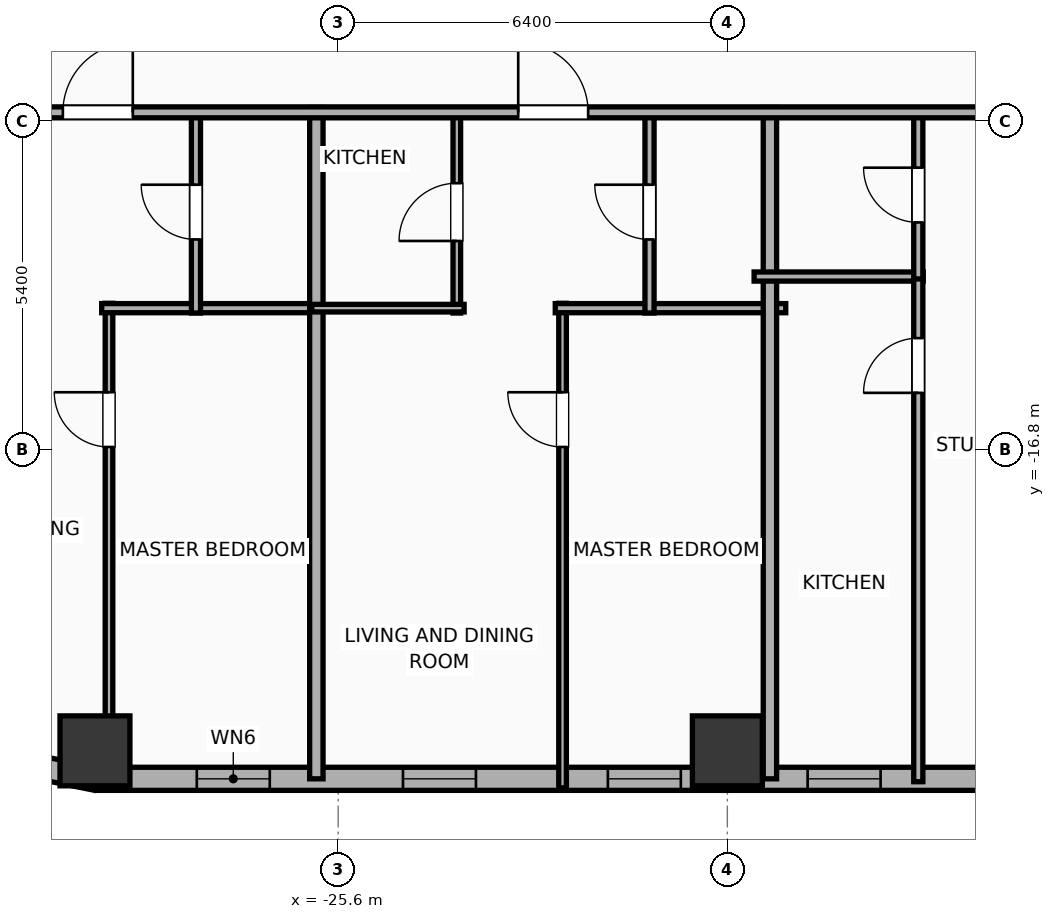
"""IFC4 building model, lengths in metres.
Left out: names, types, materials, properties, quantities, classifications, styles, units other than length and angle.
Written with IfcOpenShell. Run it as: python <this file> out.ifc"""

import sys

from ifc_helpers import new_model, si_unit, direction, frame, frame_2d, origin, origin_2d, place, context, subcontext, project, spatial, rectangle, hollow_rectangle, extrude, element, fill, save


model = new_model("IFC4")
c1 = context("Model", 3, precision=1e-05, world=origin(), true_north=direction((0.0, 1.0)))
c2 = subcontext(c1, "Body", "Model", "MODEL_VIEW")
j1 = project(units=[si_unit("LENGTHUNIT", "METRE"), si_unit("PLANEANGLEUNIT", "RADIAN")], contexts=[c1])
p1 = place(None, origin())
s1 = spatial("IfcSite", under=j1, at=p1, CompositionType="ELEMENT")
p2 = place(p1, origin())
s2 = spatial("IfcBuilding", under=s1, at=p2, CompositionType="ELEMENT")
p3 = place(p2, frame((0.0, 0.0, 76.7)))
s3 = spatial("IfcBuildingStorey", under=s2, at=p3, CompositionType="ELEMENT", Elevation=76.7)
for number, where, z_axis, x_axis in (
    (1, (-29.6, -21.75, 0.0), (0.0, 0.0, 1.0), (1.0, 0.0, 0.0)),
    (2, (-19.2, -21.75, 0.0), (0.0, 0.0, 1.0), (1.0, 0.0, 0.0)),
):
    element("IfcColumn", number, at=place(p3, frame(where, z_axis=z_axis, x_axis=x_axis)), inside=s3, PredefinedType="COLUMN", context=c2, shape_type="SweptSolid", body=[
        extrude(hollow_rectangle(XDim=1.15, YDim=1.15, WallThickness=0.04, at=origin_2d()), origin(), (0.0, 0.0, 1.0), 3.9),
    ])
p4 = place(p3, frame((22.381, -22.21, 0.0), z_axis=(0.0, 0.0, 1.0), x_axis=(-1.0, 0.0, 0.0)))
e3 = element("IfcWall", 3, at=p4, inside=s3, PredefinedType="ELEMENTEDWALL", context=c2, shape_type="SweptSolid", body=[
    extrude(rectangle(XDim=51.963, YDim=0.38, at=frame_2d((25.981, 0.0))), origin(), (0.0, 0.0, 1.0), 3.6),
])
p5 = place(p4, frame((5.81, 0.0, 0.75)))
e4 = element("IfcOpeningElement", 4, at=p5, cuts=e3, PredefinedType="OPENING", context=c2, shape_type="SweptSolid", body=[
    extrude(rectangle(XDim=2.4, YDim=2.1, at=frame_2d((1.2, 1.05))), frame((0.0, 0.2, 0.0), z_axis=(0.0, -1.0, 0.0), x_axis=(1.0, 0.0, 0.0)), (0.0, 0.0, 1.0), 0.4),
])
p6 = place(p4, frame((49.106, 0.0, 0.75)))
e5 = element("IfcOpeningElement", 5, at=p6, cuts=e3, PredefinedType="OPENING", context=c2, shape_type="SweptSolid", body=[
    extrude(rectangle(XDim=1.2, YDim=2.05, at=frame_2d((0.6, 1.025))), frame((0.0, 0.2, 0.0), z_axis=(0.0, -1.0, 0.0), x_axis=(1.0, 0.0, 0.0)), (0.0, 0.0, 1.0), 0.4),
])
p7 = place(p4, frame((45.716, 0.0, 0.75)))
e6 = element("IfcOpeningElement", 6, at=p7, cuts=e3, PredefinedType="OPENING", context=c2, shape_type="SweptSolid", body=[
    extrude(rectangle(XDim=1.2, YDim=2.05, at=frame_2d((0.6, 1.025))), frame((0.0, 0.2, 0.0), z_axis=(0.0, -1.0, 0.0), x_axis=(1.0, 0.0, 0.0)), (0.0, 0.0, 1.0), 0.4),
])
p8 = place(p4, frame((42.346, 0.0, 0.75)))
e7 = element("IfcOpeningElement", 7, at=p8, cuts=e3, PredefinedType="OPENING", context=c2, shape_type="SweptSolid", body=[
    extrude(rectangle(XDim=1.2, YDim=2.05, at=frame_2d((0.6, 1.025))), frame((0.0, 0.2, 0.0), z_axis=(0.0, -1.0, 0.0), x_axis=(1.0, 0.0, 0.0)), (0.0, 0.0, 1.0), 0.4),
])
p9 = place(p4, frame((35.811, 0.0, 0.75)))
e8 = element("IfcOpeningElement", 8, at=p9, cuts=e3, PredefinedType="OPENING", context=c2, shape_type="SweptSolid", body=[
    extrude(rectangle(XDim=1.2, YDim=2.05, at=frame_2d((0.6, 1.025))), frame((0.0, 0.2, 0.0), z_axis=(0.0, -1.0, 0.0), x_axis=(1.0, 0.0, 0.0)), (0.0, 0.0, 1.0), 0.4),
])
p10 = place(p4, frame((39.061, 0.0, 0.75)))
e9 = element("IfcOpeningElement", 9, at=p10, cuts=e3, PredefinedType="OPENING", context=c2, shape_type="SweptSolid", body=[
    extrude(rectangle(XDim=1.2, YDim=2.05, at=frame_2d((0.6, 1.025))), frame((0.0, 0.2, 0.0), z_axis=(0.0, -1.0, 0.0), x_axis=(1.0, 0.0, 0.0)), (0.0, 0.0, 1.0), 0.4),
])
p11 = place(p4, frame((29.211, 0.0, 0.75)))
e10 = element("IfcOpeningElement", 10, at=p11, cuts=e3, PredefinedType="OPENING", context=c2, shape_type="SweptSolid", body=[
    extrude(rectangle(XDim=1.2, YDim=2.05, at=frame_2d((0.6, 1.025))), frame((0.0, 0.2, 0.0), z_axis=(0.0, -1.0, 0.0), x_axis=(1.0, 0.0, 0.0)), (0.0, 0.0, 1.0), 0.4),
])
p12 = place(p4, frame((22.757, 0.0, 0.75)))
e11 = element("IfcOpeningElement", 11, at=p12, cuts=e3, PredefinedType="OPENING", context=c2, shape_type="SweptSolid", body=[
    extrude(rectangle(XDim=1.2, YDim=2.05, at=frame_2d((0.6, 1.025))), frame((0.0, 0.2, 0.0), z_axis=(0.0, -1.0, 0.0), x_axis=(1.0, 0.0, 0.0)), (0.0, 0.0, 1.0), 0.4),
])
p13 = place(p4, frame((26.007, 0.0, 0.75)))
e12 = element("IfcOpeningElement", 12, at=p13, cuts=e3, PredefinedType="OPENING", context=c2, shape_type="SweptSolid", body=[
    extrude(rectangle(XDim=1.2, YDim=2.05, at=frame_2d((0.6, 1.025))), frame((0.0, 0.2, 0.0), z_axis=(0.0, -1.0, 0.0), x_axis=(1.0, 0.0, 0.0)), (0.0, 0.0, 1.0), 0.4),
])
p14 = place(p4, frame((18.697, 0.0, 0.75)))
e13 = element("IfcOpeningElement", 13, at=p14, cuts=e3, PredefinedType="OPENING", context=c2, shape_type="SweptSolid", body=[
    extrude(rectangle(XDim=1.2, YDim=2.05, at=frame_2d((0.6, 1.025))), frame((0.0, 0.2, 0.0), z_axis=(0.0, -1.0, 0.0), x_axis=(1.0, 0.0, 0.0)), (0.0, 0.0, 1.0), 0.4),
])
p15 = place(p4, frame((15.447, 0.0, 0.75)))
e14 = element("IfcOpeningElement", 14, at=p15, cuts=e3, PredefinedType="OPENING", context=c2, shape_type="SweptSolid", body=[
    extrude(rectangle(XDim=1.2, YDim=2.05, at=frame_2d((0.6, 1.025))), frame((0.0, 0.2, 0.0), z_axis=(0.0, -1.0, 0.0), x_axis=(1.0, 0.0, 0.0)), (0.0, 0.0, 1.0), 0.4),
])
p16 = place(p4, frame((11.162, 0.0, 0.75)))
e15 = element("IfcOpeningElement", 15, at=p16, cuts=e3, PredefinedType="OPENING", context=c2, shape_type="SweptSolid", body=[
    extrude(rectangle(XDim=1.2, YDim=2.05, at=frame_2d((0.6, 1.025))), frame((0.0, 0.2, 0.0), z_axis=(0.0, -1.0, 0.0), x_axis=(1.0, 0.0, 0.0)), (0.0, 0.0, 1.0), 0.4),
])
p17 = place(p4, frame((2.974, 0.0, 0.75)))
e16 = element("IfcOpeningElement", 16, at=p17, cuts=e3, PredefinedType="OPENING", context=c2, shape_type="SweptSolid", body=[
    extrude(rectangle(XDim=1.2, YDim=2.05, at=frame_2d((0.6, 1.025))), frame((0.0, 0.2, 0.0), z_axis=(0.0, -1.0, 0.0), x_axis=(1.0, 0.0, 0.0)), (0.0, 0.0, 1.0), 0.4),
])
p18 = place(p4, frame((0.927, 0.0, 0.75)))
e17 = element("IfcOpeningElement", 17, at=p18, cuts=e3, PredefinedType="OPENING", context=c2, shape_type="SweptSolid", body=[
    extrude(rectangle(XDim=1.2, YDim=2.05, at=frame_2d((0.6, 1.025))), frame((0.0, 0.2, 0.0), z_axis=(0.0, -1.0, 0.0), x_axis=(1.0, 0.0, 0.0)), (0.0, 0.0, 1.0), 0.4),
])
p19 = place(p3, frame((-29.581, -22.21, 0.0), z_axis=(0.0, 0.0, 1.0), x_axis=(-0.980786132421, 0.195086038585, 0.0)))
e18 = element("IfcWall", 18, at=p19, inside=s3, PredefinedType="ELEMENTEDWALL", context=c2, shape_type="SweptSolid", body=[
    extrude(rectangle(XDim=1.504, YDim=0.38, at=frame_2d((0.752, 0.0))), origin(), (0.0, 0.0, 1.0), 3.6),
])
p20 = place(p3, frame((-29.369, -22.36, 0.0), z_axis=(0.0, 0.0, 1.0), x_axis=(0.0, 1.0, 0.0)))
e19 = element("IfcWall", 19, at=p20, inside=s3, PredefinedType="PARTITIONING", context=c2, shape_type="SweptSolid", body=[
    extrude(rectangle(XDim=7.97, YDim=0.125, at=frame_2d((3.985, 0.0))), origin(), (0.0, 0.0, 1.0), 3.6),
])
p21 = place(p20, frame((5.607, 0.0, 0.0)))
e20 = element("IfcOpeningElement", 20, at=p21, cuts=e19, PredefinedType="OPENING", context=c2, shape_type="SweptSolid", body=[
    extrude(rectangle(XDim=0.9, YDim=2.05, at=frame_2d((0.45, 1.025))), frame((0.0, 0.073, 0.0), z_axis=(0.0, -1.0, 0.0), x_axis=(1.0, 0.0, 0.0)), (0.0, 0.0, 1.0), 0.145),
])
p22 = place(p3, frame((-29.489, -14.47, 0.0), z_axis=(0.0, 0.0, 1.0), x_axis=(1.0, 0.0, 0.0)))
e21 = element("IfcWall", 21, at=p22, inside=s3, PredefinedType="PLUMBINGWALL", context=c2, shape_type="SweptSolid", body=[
    extrude(rectangle(XDim=3.605, YDim=0.15, at=frame_2d((1.802, 0.0))), origin(), (0.0, 0.0, 1.0), 3.6),
])
p23 = place(p3, frame((-27.939, -14.55, 0.0), z_axis=(0.0, 0.0, 1.0), x_axis=(0.0, 1.0, 0.0)))
e22 = element("IfcWall", 22, at=p23, inside=s3, PredefinedType="PLUMBINGWALL", context=c2, shape_type="SweptSolid", body=[
    extrude(rectangle(XDim=3.32, YDim=0.15, at=frame_2d((1.66, 0.0))), origin(), (0.0, 0.0, 1.0), 3.6),
])
p24 = place(p23, frame((1.21, 0.0, 0.0)))
e23 = element("IfcOpeningElement", 23, at=p24, cuts=e22, PredefinedType="OPENING", context=c2, shape_type="SweptSolid", body=[
    extrude(rectangle(XDim=0.9, YDim=2.05, at=frame_2d((0.45, 1.025))), frame((0.0, 0.085, 0.0), z_axis=(0.0, -1.0, 0.0), x_axis=(1.0, 0.0, 0.0)), (0.0, 0.0, 1.0), 0.17),
])
p25 = place(p3, frame((-25.959, -22.21, 0.0), z_axis=(0.0, 0.0, 1.0), x_axis=(0.0, 1.0, 0.0)))
e24 = element("IfcWall", 24, at=p25, inside=s3, PredefinedType="PARTITIONING", context=c2, shape_type="SweptSolid", body=[
    extrude(rectangle(XDim=11.04, YDim=0.22, at=frame_2d((5.52, 0.0))), origin(), (0.0, 0.0, 1.0), 3.6),
])
p26 = place(p3, frame((-21.91, -22.36, 0.0), z_axis=(0.0, 0.0, 1.0), x_axis=(0.0, 1.0, 0.0)))
e25 = element("IfcWall", 25, at=p26, inside=s3, PredefinedType="PARTITIONING", context=c2, shape_type="SweptSolid", body=[
    extrude(rectangle(XDim=7.97, YDim=0.125, at=frame_2d((3.985, 0.0))), origin(), (0.0, 0.0, 1.0), 3.6),
])
p27 = place(p26, frame((5.607, 0.0, 0.0)))
e26 = element("IfcOpeningElement", 26, at=p27, cuts=e25, PredefinedType="OPENING", context=c2, shape_type="SweptSolid", body=[
    extrude(rectangle(XDim=0.9, YDim=2.05, at=frame_2d((0.45, 1.025))), frame((0.0, 0.073, 0.0), z_axis=(0.0, -1.0, 0.0), x_axis=(1.0, 0.0, 0.0)), (0.0, 0.0, 1.0), 0.145),
])
p28 = place(p3, frame((-22.03, -14.47, 0.0), z_axis=(0.0, 0.0, 1.0), x_axis=(1.0, 0.0, 0.0)))
e27 = element("IfcWall", 27, at=p28, inside=s3, PredefinedType="PLUMBINGWALL", context=c2, shape_type="SweptSolid", body=[
    extrude(rectangle(XDim=3.79, YDim=0.15, at=frame_2d((1.895, 0.0))), origin(), (0.0, 0.0, 1.0), 3.6),
])
p29 = place(p3, frame((-23.649, -14.55, 0.0), z_axis=(0.0, 0.0, 1.0), x_axis=(0.0, 1.0, 0.0)))
e28 = element("IfcWall", 28, at=p29, inside=s3, PredefinedType="PARTITIONING", context=c2, shape_type="SweptSolid", body=[
    extrude(rectangle(XDim=3.32, YDim=0.125, at=frame_2d((1.66, 0.0))), origin(), (0.0, 0.0, 1.0), 3.6),
])
p30 = place(p29, frame((1.185, 0.0, 0.0)))
e29 = element("IfcOpeningElement", 29, at=p30, cuts=e28, PredefinedType="OPENING", context=c2, shape_type="SweptSolid", body=[
    extrude(rectangle(XDim=0.95, YDim=2.05, at=frame_2d((0.475, 1.025))), frame((0.0, 0.073, 0.0), z_axis=(0.0, -1.0, 0.0), x_axis=(1.0, 0.0, 0.0)), (0.0, 0.0, 1.0), 0.145),
])
p31 = place(p3, frame((-26.034, -14.47, 0.0), z_axis=(0.0, 0.0, 1.0), x_axis=(1.0, 0.0, 0.0)))
e30 = element("IfcWall", 30, at=p31, inside=s3, PredefinedType="PARTITIONING", context=c2, shape_type="SweptSolid", body=[
    extrude(rectangle(XDim=2.505, YDim=0.125, at=frame_2d((1.252, 0.0))), origin(), (0.0, 0.0, 1.0), 3.6),
])
p32 = place(p3, frame((-20.48, -14.55, 0.0), z_axis=(0.0, 0.0, 1.0), x_axis=(0.0, 1.0, 0.0)))
e31 = element("IfcWall", 31, at=p32, inside=s3, PredefinedType="PLUMBINGWALL", context=c2, shape_type="SweptSolid", body=[
    extrude(rectangle(XDim=3.32, YDim=0.15, at=frame_2d((1.66, 0.0))), origin(), (0.0, 0.0, 1.0), 3.6),
])
p33 = place(p32, frame((1.21, 0.0, 0.0)))
e32 = element("IfcOpeningElement", 32, at=p33, cuts=e31, PredefinedType="OPENING", context=c2, shape_type="SweptSolid", body=[
    extrude(rectangle(XDim=0.9, YDim=2.05, at=frame_2d((0.45, 1.025))), frame((0.0, 0.085, 0.0), z_axis=(0.0, -1.0, 0.0), x_axis=(1.0, 0.0, 0.0)), (0.0, 0.0, 1.0), 0.17),
])
p34 = place(p3, frame((-18.5, -22.21, 0.0), z_axis=(0.0, 0.0, 1.0), x_axis=(0.0, 1.0, 0.0)))
e33 = element("IfcWall", 33, at=p34, inside=s3, PredefinedType="PARTITIONING", context=c2, shape_type="SweptSolid", body=[
    extrude(rectangle(XDim=11.04, YDim=0.22, at=frame_2d((5.52, 0.0))), origin(), (0.0, 0.0, 1.0), 3.6),
])
p35 = place(p3, frame((-18.76, -13.95, 0.0), z_axis=(0.0, 0.0, 1.0), x_axis=(1.0, 0.0, 0.0)))
e34 = element("IfcWall", 34, at=p35, inside=s3, PredefinedType="PLUMBINGWALL", context=c2, shape_type="SweptSolid", body=[
    extrude(rectangle(XDim=2.78, YDim=0.15, at=frame_2d((1.39, 0.0))), origin(), (0.0, 0.0, 1.0), 3.6),
])
p36 = place(p3, frame((-16.06, -22.258, 0.0), z_axis=(0.0, 0.0, 1.0), x_axis=(0.0, 1.0, 0.0)))
e35 = element("IfcWall", 35, at=p36, inside=s3, PredefinedType="PLUMBINGWALL", context=c2, shape_type="SweptSolid", body=[
    extrude(rectangle(XDim=8.348, YDim=0.15, at=frame_2d((4.174, 0.0))), origin(), (0.0, 0.0, 1.0), 3.6),
])
p37 = place(p36, frame((6.395, 0.0, 0.0)))
e36 = element("IfcOpeningElement", 36, at=p37, cuts=e35, PredefinedType="OPENING", context=c2, shape_type="SweptSolid", body=[
    extrude(rectangle(XDim=0.9, YDim=2.05, at=frame_2d((0.45, 1.025))), frame((0.0, 0.085, 0.0), z_axis=(0.0, -1.0, 0.0), x_axis=(1.0, 0.0, 0.0)), (0.0, 0.0, 1.0), 0.17),
])
p38 = place(p3, frame((-16.06, -13.99, 0.0), z_axis=(0.0, 0.0, 1.0), x_axis=(0.0, 1.0, 0.0)))
e37 = element("IfcWall", 37, at=p38, inside=s3, PredefinedType="PLUMBINGWALL", context=c2, shape_type="SweptSolid", body=[
    extrude(rectangle(XDim=2.76, YDim=0.15, at=frame_2d((1.38, 0.0))), origin(), (0.0, 0.0, 1.0), 3.6),
])
p39 = place(p38, frame((0.93, 0.0, 0.0)))
e38 = element("IfcOpeningElement", 38, at=p39, cuts=e37, PredefinedType="OPENING", context=c2, shape_type="SweptSolid", body=[
    extrude(rectangle(XDim=0.9, YDim=2.05, at=frame_2d((0.45, 1.025))), frame((0.0, 0.085, 0.0), z_axis=(0.0, -1.0, 0.0), x_axis=(1.0, 0.0, 0.0)), (0.0, 0.0, 1.0), 0.17),
])
p40 = place(p3, frame((-33.41, -11.25, 0.0), z_axis=(0.0, 0.0, 1.0), x_axis=(1.0, 0.0, 0.0)))
e39 = element("IfcWall", 39, at=p40, inside=s3, PredefinedType="PARTITIONING", context=c2, shape_type="SweptSolid", body=[
    extrude(rectangle(XDim=59.62, YDim=0.18, at=frame_2d((29.81, 0.0))), origin(), (0.0, 0.0, 1.0), 3.6),
])
p41 = place(p40, frame((3.282, 0.0, 0.0)))
e40 = element("IfcOpeningElement", 40, at=p41, cuts=e39, PredefinedType="OPENING", context=c2, shape_type="SweptSolid", body=[
    extrude(rectangle(XDim=1.15, YDim=2.05, at=frame_2d((0.575, 1.025))), frame((0.0, 0.1, 0.0), z_axis=(0.0, -1.0, 0.0), x_axis=(1.0, 0.0, 0.0)), (0.0, 0.0, 1.0), 0.2),
])
p42 = place(p40, frame((10.771, 0.0, 0.0)))
e41 = element("IfcOpeningElement", 41, at=p42, cuts=e39, PredefinedType="OPENING", context=c2, shape_type="SweptSolid", body=[
    extrude(rectangle(XDim=1.15, YDim=2.05, at=frame_2d((0.575, 1.025))), frame((0.0, 0.1, 0.0), z_axis=(0.0, -1.0, 0.0), x_axis=(1.0, 0.0, 0.0)), (0.0, 0.0, 1.0), 0.2),
])
p43 = place(p40, frame((18.778, 0.0, 0.0)))
e42 = element("IfcOpeningElement", 42, at=p43, cuts=e39, PredefinedType="OPENING", context=c2, shape_type="SweptSolid", body=[
    extrude(rectangle(XDim=1.15, YDim=2.05, at=frame_2d((0.575, 1.025))), frame((0.0, 0.1, 0.0), z_axis=(0.0, -1.0, 0.0), x_axis=(1.0, 0.0, 0.0)), (0.0, 0.0, 1.0), 0.2),
])
p44 = place(p40, frame((24.34, 0.0, 0.0)))
e43 = element("IfcOpeningElement", 43, at=p44, cuts=e39, PredefinedType="OPENING", context=c2, shape_type="SweptSolid", body=[
    extrude(rectangle(XDim=0.9, YDim=2.05, at=frame_2d((0.45, 1.025))), frame((0.0, 0.1, 0.0), z_axis=(0.0, -1.0, 0.0), x_axis=(1.0, 0.0, 0.0)), (0.0, 0.0, 1.0), 0.2),
])
p45 = place(p40, frame((31.829, 0.0, 0.0)))
e44 = element("IfcOpeningElement", 44, at=p45, cuts=e39, PredefinedType="OPENING", context=c2, shape_type="SweptSolid", body=[
    extrude(rectangle(XDim=1.15, YDim=2.05, at=frame_2d((0.575, 1.025))), frame((0.0, 0.1, 0.0), z_axis=(0.0, -1.0, 0.0), x_axis=(1.0, 0.0, 0.0)), (0.0, 0.0, 1.0), 0.2),
])
p46 = place(p40, frame((35.948, 0.0, 0.0)))
e45 = element("IfcOpeningElement", 45, at=p46, cuts=e39, PredefinedType="OPENING", context=c2, shape_type="SweptSolid", body=[
    extrude(rectangle(XDim=1.15, YDim=2.05, at=frame_2d((0.575, 1.025))), frame((0.0, 0.1, 0.0), z_axis=(0.0, -1.0, 0.0), x_axis=(1.0, 0.0, 0.0)), (0.0, 0.0, 1.0), 0.2),
])
p47 = place(p40, frame((43.705, 0.0, 0.0)))
e46 = element("IfcOpeningElement", 46, at=p47, cuts=e39, PredefinedType="OPENING", context=c2, shape_type="SweptSolid", body=[
    extrude(rectangle(XDim=0.9, YDim=2.05, at=frame_2d((0.45, 1.025))), frame((0.0, 0.1, 0.0), z_axis=(0.0, -1.0, 0.0), x_axis=(1.0, 0.0, 0.0)), (0.0, 0.0, 1.0), 0.2),
])
p48 = place(p40, frame((48.552, 0.0, 0.0)))
e47 = element("IfcOpeningElement", 47, at=p48, cuts=e39, PredefinedType="OPENING", context=c2, shape_type="SweptSolid", body=[
    extrude(rectangle(XDim=1.15, YDim=2.05, at=frame_2d((0.575, 1.025))), frame((0.0, 0.1, 0.0), z_axis=(0.0, -1.0, 0.0), x_axis=(1.0, 0.0, 0.0)), (0.0, 0.0, 1.0), 0.2),
])
p49 = place(p40, frame((56.213, 0.0, 0.0)))
e48 = element("IfcOpeningElement", 48, at=p49, cuts=e39, PredefinedType="OPENING", context=c2, shape_type="SweptSolid", body=[
    extrude(rectangle(XDim=0.9, YDim=2.05, at=frame_2d((0.45, 1.025))), frame((0.0, 0.1, 0.0), z_axis=(0.0, -1.0, 0.0), x_axis=(1.0, 0.0, 0.0)), (0.0, 0.0, 1.0), 0.2),
])
p50 = place(p6, origin())
e49 = element("IfcWindow", 49, at=p50, inside=s3, PartitioningType="SINGLE_PANEL", PredefinedType="WINDOW", context=c2, shape_type="SweptSolid", body=[
    extrude(rectangle(XDim=1.2, YDim=2.05, at=frame_2d((0.6, 1.025))), frame((0.0, 0.03, 0.0), z_axis=(0.0, -1.0, 0.0), x_axis=(1.0, 0.0, 0.0)), (0.0, 0.0, 1.0), 0.06),
])
fill(e5, e49)
p51 = place(p7, origin())
e50 = element("IfcWindow", 50, at=p51, inside=s3, PartitioningType="SINGLE_PANEL", PredefinedType="WINDOW", context=c2, shape_type="SweptSolid", body=[
    extrude(rectangle(XDim=1.2, YDim=2.05, at=frame_2d((0.6, 1.025))), frame((0.0, 0.03, 0.0), z_axis=(0.0, -1.0, 0.0), x_axis=(1.0, 0.0, 0.0)), (0.0, 0.0, 1.0), 0.06),
])
fill(e6, e50)
p52 = place(p8, origin())
e51 = element("IfcWindow", 51, at=p52, inside=s3, PartitioningType="SINGLE_PANEL", PredefinedType="WINDOW", context=c2, shape_type="SweptSolid", body=[
    extrude(rectangle(XDim=1.2, YDim=2.05, at=frame_2d((0.6, 1.025))), frame((0.0, 0.03, 0.0), z_axis=(0.0, -1.0, 0.0), x_axis=(1.0, 0.0, 0.0)), (0.0, 0.0, 1.0), 0.06),
])
fill(e7, e51)
p53 = place(p10, origin())
e52 = element("IfcWindow", 52, at=p53, inside=s3, PartitioningType="SINGLE_PANEL", PredefinedType="WINDOW", context=c2, shape_type="SweptSolid", body=[
    extrude(rectangle(XDim=1.2, YDim=2.05, at=frame_2d((0.6, 1.025))), frame((0.0, 0.03, 0.0), z_axis=(0.0, -1.0, 0.0), x_axis=(1.0, 0.0, 0.0)), (0.0, 0.0, 1.0), 0.06),
])
fill(e9, e52)
p54 = place(p21, origin())
e53 = element("IfcDoor", 53, at=p54, inside=s3, OperationType="SINGLE_SWING_RIGHT", PredefinedType="DOOR", context=c2, shape_type="SweptSolid", body=[
    extrude(rectangle(XDim=0.9, YDim=2.05, at=frame_2d((0.45, 1.025))), frame((0.0, 0.025, 0.0), z_axis=(0.0, -1.0, 0.0), x_axis=(1.0, 0.0, 0.0)), (0.0, 0.0, 1.0), 0.05),
])
fill(e20, e53)
p55 = place(p24, origin())
e54 = element("IfcDoor", 54, at=p55, inside=s3, OperationType="SINGLE_SWING_RIGHT", PredefinedType="DOOR", context=c2, shape_type="SweptSolid", body=[
    extrude(rectangle(XDim=0.9, YDim=2.05, at=frame_2d((0.45, 1.025))), frame((0.0, 0.025, 0.0), z_axis=(0.0, -1.0, 0.0), x_axis=(1.0, 0.0, 0.0)), (0.0, 0.0, 1.0), 0.05),
])
fill(e23, e54)
p56 = place(p27, origin())
e55 = element("IfcDoor", 55, at=p56, inside=s3, OperationType="SINGLE_SWING_RIGHT", PredefinedType="DOOR", context=c2, shape_type="SweptSolid", body=[
    extrude(rectangle(XDim=0.9, YDim=2.05, at=frame_2d((0.45, 1.025))), frame((0.0, 0.025, 0.0), z_axis=(0.0, -1.0, 0.0), x_axis=(1.0, 0.0, 0.0)), (0.0, 0.0, 1.0), 0.05),
])
fill(e26, e55)
p57 = place(p30, origin())
e56 = element("IfcDoor", 56, at=p57, inside=s3, OperationType="SINGLE_SWING_LEFT", PredefinedType="DOOR", context=c2, shape_type="SweptSolid", body=[
    extrude(rectangle(XDim=0.95, YDim=2.05, at=frame_2d((0.475, 1.025))), frame((0.0, 0.025, 0.0), z_axis=(0.0, -1.0, 0.0), x_axis=(1.0, 0.0, 0.0)), (0.0, 0.0, 1.0), 0.05),
])
fill(e29, e56)
p58 = place(p33, origin())
e57 = element("IfcDoor", 57, at=p58, inside=s3, OperationType="SINGLE_SWING_RIGHT", PredefinedType="DOOR", context=c2, shape_type="SweptSolid", body=[
    extrude(rectangle(XDim=0.9, YDim=2.05, at=frame_2d((0.45, 1.025))), frame((0.0, 0.025, 0.0), z_axis=(0.0, -1.0, 0.0), x_axis=(1.0, 0.0, 0.0)), (0.0, 0.0, 1.0), 0.05),
])
fill(e32, e57)
p59 = place(p37, origin())
e58 = element("IfcDoor", 58, at=p59, inside=s3, OperationType="SINGLE_SWING_LEFT", PredefinedType="DOOR", context=c2, shape_type="SweptSolid", body=[
    extrude(rectangle(XDim=0.9, YDim=2.05, at=frame_2d((0.45, 1.025))), frame((0.0, 0.025, 0.0), z_axis=(0.0, -1.0, 0.0), x_axis=(1.0, 0.0, 0.0)), (0.0, 0.0, 1.0), 0.05),
])
fill(e36, e58)
p60 = place(p39, origin())
e59 = element("IfcDoor", 59, at=p60, inside=s3, OperationType="SINGLE_SWING_RIGHT", PredefinedType="DOOR", context=c2, shape_type="SweptSolid", body=[
    extrude(rectangle(XDim=0.9, YDim=2.05, at=frame_2d((0.45, 1.025))), frame((0.0, 0.025, 0.0), z_axis=(0.0, -1.0, 0.0), x_axis=(1.0, 0.0, 0.0)), (0.0, 0.0, 1.0), 0.05),
])
fill(e38, e59)
p61 = place(p41, origin())
e60 = element("IfcDoor", 60, at=p61, inside=s3, OperationType="SINGLE_SWING_RIGHT", PredefinedType="DOOR", context=c2, shape_type="SweptSolid", body=[
    extrude(rectangle(XDim=1.15, YDim=2.05, at=frame_2d((0.575, 1.025))), frame((0.0, 0.025, 0.0), z_axis=(0.0, -1.0, 0.0), x_axis=(1.0, 0.0, 0.0)), (0.0, 0.0, 1.0), 0.05),
])
fill(e40, e60)
p62 = place(p42, origin())
e61 = element("IfcDoor", 61, at=p62, inside=s3, OperationType="SINGLE_SWING_LEFT", PredefinedType="DOOR", context=c2, shape_type="SweptSolid", body=[
    extrude(rectangle(XDim=1.15, YDim=2.05, at=frame_2d((0.575, 1.025))), frame((0.0, 0.025, 0.0), z_axis=(0.0, -1.0, 0.0), x_axis=(1.0, 0.0, 0.0)), (0.0, 0.0, 1.0), 0.05),
])
fill(e41, e61)
save(model, sys.argv[1])
